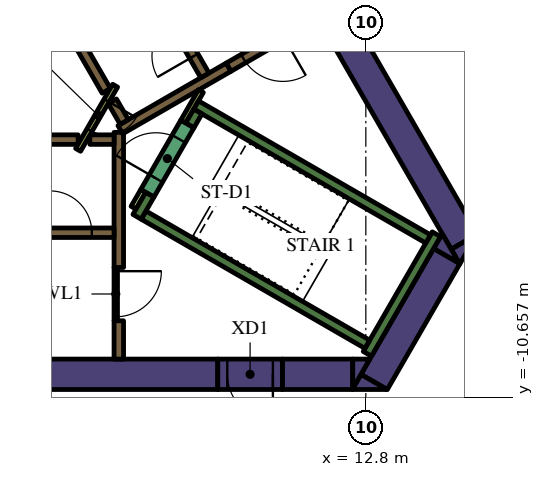
"""IFC4 building model, lengths in metres.
Left out: names, types, materials, properties, quantities, classifications, styles, units other than length and angle.
Written with IfcOpenShell. Run it as: python <this file> out.ifc"""

import sys

from ifc_helpers import new_model, si_unit, direction, frame, frame_2d, origin, place, context, subcontext, project, spatial, polyline, rectangle, outline, extrude, element, fill, save


model = new_model("IFC4")
c1 = context("Model", 3, precision=1e-05, world=origin(), true_north=direction((0.0, 1.0)))
c2 = subcontext(c1, "Body", "Model", "MODEL_VIEW")
j1 = project(units=[si_unit("LENGTHUNIT", "METRE"), si_unit("PLANEANGLEUNIT", "RADIAN")], contexts=[c1])
p1 = place(None, origin())
s1 = spatial("IfcSite", under=j1, at=p1, CompositionType="ELEMENT")
p2 = place(p1, origin())
s2 = spatial("IfcBuilding", under=s1, at=p2, CompositionType="ELEMENT")
p3 = place(p2, frame((0.0, 0.0, 150.0)))
s3 = spatial("IfcBuildingStorey", under=s2, at=p3, CompositionType="ELEMENT", Elevation=150.0)
p4 = place(p3, frame((9.129, 4.289, 0.0), z_axis=(0.0, 0.0, 1.0), x_axis=(0.499995742806, -0.866027861663, 0.0)))
e1 = element("IfcWall", 1, at=p4, inside=s3, PredefinedType="SOLIDWALL", context=c2, shape_type="SweptSolid", body=[
    extrude(rectangle(XDim=12.527, YDim=0.8, at=frame_2d((6.264, 0.0))), origin(), (0.0, 0.0, 1.0), 4.2),
])
p5 = place(p3, origin())
e2 = element("IfcWall", 2, at=p5, inside=s3, PredefinedType="SOLIDWALL", context=c2, shape_type="SweptSolid", body=[
    extrude(outline(polyline([(15.271, -7.15), (15.047, -6.762), (15.719, -6.374), (15.271, -7.15)])), origin(), (0.0, 0.0, 1.0), 4.2),
])
p6 = place(p3, frame((13.018, -10.252, 0.0), z_axis=(0.0, 0.0, 1.0), x_axis=(0.499984020225, 0.866034629516, 0.0)))
e3 = element("IfcWall", 3, at=p6, inside=s3, PredefinedType="SOLIDWALL", context=c2, shape_type="SweptSolid", body=[
    extrude(rectangle(XDim=3.824, YDim=0.8, at=frame_2d((1.912, 0.0))), origin(), (0.0, 0.0, 1.0), 4.2),
])
e4 = element("IfcWall", 4, at=p5, inside=s3, PredefinedType="SOLIDWALL", context=c2, shape_type="SweptSolid", body=[
    extrude(outline(polyline([(12.671, -10.053), (13.358, -10.45), (12.442, -10.45), (12.671, -10.053)])), origin(), (0.0, 0.0, 1.0), 4.2),
])
e5 = element("IfcWall", 5, at=p5, inside=s3, PredefinedType="SOLIDWALL", context=c2, shape_type="SweptSolid", body=[
    extrude(outline(polyline([(14.809, -6.35), (15.257, -7.126), (14.585, -6.738), (14.809, -6.35)])), origin(), (0.0, 0.0, 1.0), 4.2),
])
p7 = place(p3, frame((10.604, -10.05, 0.0), z_axis=(0.0, 0.0, 1.0), x_axis=(1.0, 0.0, 0.0)))
e6 = element("IfcWall", 6, at=p7, inside=s3, PredefinedType="SOLIDWALL", context=c2, shape_type="SweptSolid", body=[
    extrude(rectangle(XDim=1.849, YDim=0.8, at=frame_2d((0.925, 0.0))), origin(), (0.0, 0.0, 1.0), 4.2),
])
e7 = element("IfcWall", 7, at=p5, inside=s3, PredefinedType="SOLIDWALL", context=c2, shape_type="SweptSolid", body=[
    extrude(outline(polyline([(12.904, -9.65), (12.456, -10.426), (12.456, -9.65), (12.904, -9.65)])), origin(), (0.0, 0.0, 1.0), 4.2),
])
p8 = place(p3, frame((-13.378, -10.05, 0.0), z_axis=(0.0, 0.0, 1.0), x_axis=(1.0, 0.0, 0.0)))
e8 = element("IfcWall", 8, at=p8, inside=s3, PredefinedType="SOLIDWALL", context=c2, shape_type="SweptSolid", body=[
    extrude(rectangle(XDim=22.282, YDim=0.8, at=frame_2d((11.141, 0.0))), origin(), (0.0, 0.0, 1.0), 4.2),
])
p9 = place(p3, frame((12.84, -9.511, 0.0), z_axis=(0.0, 0.0, 1.0), x_axis=(0.499997733992, 0.866026712061, 0.0)))
e9 = element("IfcWall", 9, at=p9, inside=s3, PredefinedType="SOLIDWALL", context=c2, shape_type="SweptSolid", body=[
    extrude(rectangle(XDim=3.634, YDim=0.25, at=frame_2d((1.817, 0.0))), origin(), (0.0, 0.0, 1.0), 4.2),
])
p10 = place(p3, frame((12.84, -9.261, 0.0), z_axis=(0.0, 0.0, 1.0), x_axis=(-0.866013990052, 0.500019768644, 0.0)))
e10 = element("IfcWall", 10, at=p10, inside=s3, PredefinedType="SOLIDWALL", context=c2, shape_type="SweptSolid", body=[
    extrude(rectangle(XDim=6.8, YDim=0.25, at=frame_2d((3.4, 0.0))), origin(), (0.0, 0.0, 1.0), 4.2),
])
p11 = place(p3, frame((6.78, -5.906, 0.0), z_axis=(0.0, 0.0, 1.0), x_axis=(0.500223362819, 0.865896406789, 0.0)))
e11 = element("IfcWall", 11, at=p11, inside=s3, PredefinedType="SOLIDWALL", context=c2, shape_type="SweptSolid", body=[
    extrude(rectangle(XDim=0.675, YDim=0.25, at=frame_2d((0.337, 0.0))), origin(), (0.0, 0.0, 1.0), 4.2),
])
p12 = place(p3, frame((8.334, -2.964, 0.0), z_axis=(0.0, 0.0, 1.0), x_axis=(0.866016039709, -0.500016218704, 0.0)))
e12 = element("IfcWall", 12, at=p12, inside=s3, PredefinedType="SOLIDWALL", context=c2, shape_type="SweptSolid", body=[
    extrude(rectangle(XDim=7.05, YDim=0.25, at=frame_2d((3.525, 0.0))), origin(), (0.0, 0.0, 1.0), 4.2),
])
p13 = place(p3, frame((8.168, -3.503, 0.0), z_axis=(0.0, 0.0, 1.0), x_axis=(0.49972245349, 0.866185586049, 0.0)))
e13 = element("IfcWall", 13, at=p13, inside=s3, PredefinedType="SOLIDWALL", context=c2, shape_type="SweptSolid", body=[
    extrude(rectangle(XDim=0.425, YDim=0.25, at=frame_2d((0.212, 0.0))), origin(), (0.0, 0.0, 1.0), 4.2),
])
p14 = place(p3, frame((-5.259, -3.875, 0.0), z_axis=(0.0, 0.0, 1.0), x_axis=(1.0, 0.0, 0.0)))
e14 = element("IfcWall", 14, at=p14, inside=s3, PredefinedType="SOLIDWALL", context=c2, shape_type="SweptSolid", body=[
    extrude(rectangle(XDim=10.489, YDim=0.25, at=frame_2d((5.244, 0.0))), origin(), (0.0, 0.0, 1.0), 4.2),
])
p15 = place(p3, frame((6.3, -7.24, 0.0), z_axis=(0.0, 0.0, 1.0), x_axis=(0.0, 1.0, 0.0)))
e15 = element("IfcWall", 15, at=p15, inside=s3, PredefinedType="SOLIDWALL", context=c2, shape_type="SweptSolid", body=[
    extrude(rectangle(XDim=3.556, YDim=0.25, at=frame_2d((1.778, 0.0))), origin(), (0.0, 0.0, 1.0), 4.2),
])
p16 = place(p3, frame((6.3, -9.65, 0.0), z_axis=(0.0, 0.0, 1.0), x_axis=(0.0, 1.0, 0.0)))
e16 = element("IfcWall", 16, at=p16, inside=s3, PredefinedType="SOLIDWALL", context=c2, shape_type="SweptSolid", body=[
    extrude(rectangle(XDim=1.008, YDim=0.25, at=frame_2d((0.504, 0.0))), origin(), (0.0, 0.0, 1.0), 4.2),
])
p17 = place(p3, frame((5.538, -3.875, 0.0), z_axis=(0.0, 0.0, 1.0), x_axis=(1.0, 0.0, 0.0)))
e17 = element("IfcWall", 17, at=p17, inside=s3, PredefinedType="SOLIDWALL", context=c2, shape_type="SweptSolid", body=[
    extrude(rectangle(XDim=0.637, YDim=0.25, at=frame_2d((0.318, 0.0))), origin(), (0.0, 0.0, 1.0), 4.2),
])
p18 = place(p3, frame((9.19, -1.969, 0.0), z_axis=(0.0, 0.0, 1.0), x_axis=(-0.866057109641, -0.499945079824, 0.0)))
e18 = element("IfcWall", 18, at=p18, inside=s3, PredefinedType="SOLIDWALL", context=c2, shape_type="SweptSolid", body=[
    extrude(rectangle(XDim=3.291, YDim=0.25, at=frame_2d((1.646, 0.0))), origin(), (0.0, 0.0, 1.0), 4.2),
])
p19 = place(p3, frame((6.13, -2.867, 0.0), z_axis=(0.0, 0.0, 1.0), x_axis=(0.500160776593, -0.865932559475, 0.0)))
e19 = element("IfcWall", 19, at=p19, inside=s3, PredefinedType="SOLIDWALL", context=c2, shape_type="SweptSolid", body=[
    extrude(rectangle(XDim=0.627, YDim=0.25, at=frame_2d((0.313, 0.0))), origin(), (0.0, 0.0, 1.0), 4.2),
])
p20 = place(p3, frame((5.97, -2.591, 0.0), z_axis=(0.0, 0.0, 1.0), x_axis=(-0.499994469932, 0.866028596547, 0.0)))
e20 = element("IfcWall", 20, at=p20, inside=s3, PredefinedType="SOLIDWALL", context=c2, shape_type="SweptSolid", body=[
    extrude(rectangle(XDim=10.488, YDim=0.25, at=frame_2d((5.244, 0.0))), origin(), (0.0, 0.0, 1.0), 4.2),
])
p21 = place(p3, frame((6.945, -5.222, 0.0), z_axis=(0.0, 0.0, 1.0), x_axis=(-0.499818422106, -0.866130212453, 0.0)))
e21 = element("IfcWall", 21, at=p21, inside=s3, PredefinedType="PARTITIONING", context=c2, shape_type="SweptSolid", body=[
    extrude(rectangle(XDim=0.514, YDim=0.15, at=frame_2d((0.257, 0.0))), origin(), (0.0, 0.0, 1.0), 3.15),
])
p22 = place(p3, frame((8.459, -2.599, 0.0), z_axis=(0.0, 0.0, 1.0), x_axis=(-0.500041054325, -0.866001699761, 0.0)))
e22 = element("IfcWall", 22, at=p22, inside=s3, PredefinedType="PARTITIONING", context=c2, shape_type="SweptSolid", body=[
    extrude(rectangle(XDim=0.929, YDim=0.15, at=frame_2d((0.464, 0.0))), origin(), (0.0, 0.0, 1.0), 4.2),
])
p23 = place(p3, frame((-6.175, -6.325, 0.0), z_axis=(0.0, 0.0, 1.0), x_axis=(1.0, 0.0, 0.0)))
e23 = element("IfcWall", 23, at=p23, inside=s3, PredefinedType="SOLIDWALL", context=c2, shape_type="SweptSolid", body=[
    extrude(rectangle(XDim=12.35, YDim=0.25, at=frame_2d((6.175, 0.0))), origin(), (0.0, 0.0, 1.0), 4.2),
])
p24 = place(p23, frame((0.585, 0.0, 0.0)))
e24 = element("IfcOpeningElement", 24, at=p24, cuts=e23, PredefinedType="OPENING", context=c2, shape_type="SweptSolid", body=[
    extrude(rectangle(XDim=1.1, YDim=2.1, at=frame_2d((0.55, 1.05))), frame((0.0, 0.135, 0.0), z_axis=(0.0, -1.0, 0.0), x_axis=(1.0, 0.0, 0.0)), (0.0, 0.0, 1.0), 0.27),
])
p25 = place(p23, frame((3.105, 0.0, 0.0)))
e25 = element("IfcOpeningElement", 25, at=p25, cuts=e23, PredefinedType="OPENING", context=c2, shape_type="SweptSolid", body=[
    extrude(rectangle(XDim=1.1, YDim=2.1, at=frame_2d((0.55, 1.05))), frame((0.0, 0.135, 0.0), z_axis=(0.0, -1.0, 0.0), x_axis=(1.0, 0.0, 0.0)), (0.0, 0.0, 1.0), 0.27),
])
p26 = place(p23, frame((5.625, 0.0, 0.0)))
e26 = element("IfcOpeningElement", 26, at=p26, cuts=e23, PredefinedType="OPENING", context=c2, shape_type="SweptSolid", body=[
    extrude(rectangle(XDim=1.1, YDim=2.1, at=frame_2d((0.55, 1.05))), frame((0.0, 0.135, 0.0), z_axis=(0.0, -1.0, 0.0), x_axis=(1.0, 0.0, 0.0)), (0.0, 0.0, 1.0), 0.27),
])
p27 = place(p23, frame((8.145, 0.0, 0.0)))
e27 = element("IfcOpeningElement", 27, at=p27, cuts=e23, PredefinedType="OPENING", context=c2, shape_type="SweptSolid", body=[
    extrude(rectangle(XDim=1.1, YDim=2.1, at=frame_2d((0.55, 1.05))), frame((0.0, 0.135, 0.0), z_axis=(0.0, -1.0, 0.0), x_axis=(1.0, 0.0, 0.0)), (0.0, 0.0, 1.0), 0.27),
])
p28 = place(p23, frame((10.665, 0.0, 0.0)))
e28 = element("IfcOpeningElement", 28, at=p28, cuts=e23, PredefinedType="OPENING", context=c2, shape_type="SweptSolid", body=[
    extrude(rectangle(XDim=1.1, YDim=2.1, at=frame_2d((0.55, 1.05))), frame((0.0, 0.135, 0.0), z_axis=(0.0, -1.0, 0.0), x_axis=(1.0, 0.0, 0.0)), (0.0, 0.0, 1.0), 0.27),
])
p29 = place(p3, frame((8.565, -2.185, 0.0), z_axis=(0.0, 0.0, 1.0), x_axis=(-0.499997954832, 0.866026584559, 0.0)))
e29 = element("IfcWall", 29, at=p29, inside=s3, PredefinedType="SOLIDWALL", context=c2, shape_type="SweptSolid", body=[
    extrude(rectangle(XDim=12.35, YDim=0.25, at=frame_2d((6.175, 0.0))), origin(), (0.0, 0.0, 1.0), 4.2),
])
p30 = place(p29, frame((0.585, 0.0, 0.0)))
e30 = element("IfcOpeningElement", 30, at=p30, cuts=e29, PredefinedType="OPENING", context=c2, shape_type="SweptSolid", body=[
    extrude(rectangle(XDim=1.1, YDim=2.1, at=frame_2d((0.55, 1.05))), frame((0.0, 0.135, 0.0), z_axis=(0.0, -1.0, 0.0), x_axis=(1.0, 0.0, 0.0)), (0.0, 0.0, 1.0), 0.27),
])
p31 = place(p3, frame((7.053, -5.284, 0.0), z_axis=(0.0, 0.0, 1.0), x_axis=(0.500078061341, 0.865980330357, 0.0)))
e31 = element("IfcWall", 31, at=p31, inside=s3, PredefinedType="SOLIDWALL", context=c2, shape_type="SweptSolid", body=[
    extrude(rectangle(XDim=2.1, YDim=0.4, at=frame_2d((1.05, 0.0))), origin(), (0.0, 0.0, 1.0), 4.2),
])
p32 = place(p31, frame((0.45, 0.0, 0.0)))
e32 = element("IfcOpeningElement", 32, at=p32, cuts=e31, PredefinedType="OPENING", context=c2, shape_type="SweptSolid", body=[
    extrude(rectangle(XDim=1.2, YDim=2.1, at=frame_2d((0.6, 1.05))), frame((0.0, 0.21, 0.0), z_axis=(0.0, -1.0, 0.0), x_axis=(1.0, 0.0, 0.0)), (0.0, 0.0, 1.0), 0.42),
])
p33 = place(p3, frame((6.203, -2.456, 0.0), z_axis=(0.0, 0.0, 1.0), x_axis=(-0.500043961785, -0.866000020948, 0.0)))
e33 = element("IfcWall", 33, at=p33, inside=s3, PredefinedType="PARTITIONING", context=c2, shape_type="SweptSolid", body=[
    extrude(rectangle(XDim=1.95, YDim=0.15, at=frame_2d((0.975, 0.0))), origin(), (0.0, 0.0, 1.0), 4.2),
])
p34 = place(p33, frame((0.45, 0.0, 0.0)))
e34 = element("IfcOpeningElement", 34, at=p34, cuts=e33, PredefinedType="OPENING", context=c2, shape_type="SweptSolid", body=[
    extrude(rectangle(XDim=0.9, YDim=2.1, at=frame_2d((0.45, 1.05))), frame((0.0, 0.085, 0.0), z_axis=(0.0, -1.0, 0.0), x_axis=(1.0, 0.0, 0.0)), (0.0, 0.0, 1.0), 0.17),
])
p35 = place(p3, frame((6.22, -7.237, 0.0), z_axis=(0.0, 0.0, 1.0), x_axis=(0.0, -1.0, 0.0)))
e35 = element("IfcWall", 35, at=p35, inside=s3, PredefinedType="PARTITIONING", context=c2, shape_type="SweptSolid", body=[
    extrude(rectangle(XDim=1.4, YDim=0.09, at=frame_2d((0.7, 0.0))), origin(), (0.0, 0.0, 1.0), 3.15),
])
p36 = place(p35, frame((0.1, 0.0, 0.0)))
e36 = element("IfcOpeningElement", 36, at=p36, cuts=e35, PredefinedType="OPENING", context=c2, shape_type="SweptSolid", body=[
    extrude(rectangle(XDim=1.2, YDim=2.1, at=frame_2d((0.6, 1.05))), frame((0.0, 0.055, 0.0), z_axis=(0.0, -1.0, 0.0), x_axis=(1.0, 0.0, 0.0)), (0.0, 0.0, 1.0), 0.11),
])
p37 = place(p3, frame((11.009, -0.919, 0.0), z_axis=(0.0, 0.0, 1.0), x_axis=(-0.866059744384, -0.49994051562, 0.0)))
e37 = element("IfcWall", 37, at=p37, inside=s3, PredefinedType="SOLIDWALL", context=c2, shape_type="SweptSolid", body=[
    extrude(rectangle(XDim=2.1, YDim=0.25, at=frame_2d((1.05, 0.0))), origin(), (0.0, 0.0, 1.0), 4.2),
])
p38 = place(p37, frame((0.45, 0.0, 0.0)))
e38 = element("IfcOpeningElement", 38, at=p38, cuts=e37, PredefinedType="OPENING", context=c2, shape_type="SweptSolid", body=[
    extrude(rectangle(XDim=1.2, YDim=2.1, at=frame_2d((0.6, 1.05))), frame((0.0, 0.135, 0.0), z_axis=(0.0, -1.0, 0.0), x_axis=(1.0, 0.0, 0.0)), (0.0, 0.0, 1.0), 0.27),
])
p39 = place(p3, frame((10.604, -10.05, 0.0), z_axis=(0.0, 0.0, 1.0), x_axis=(-1.0, 0.0, 0.0)))
e39 = element("IfcWall", 39, at=p39, inside=s3, PredefinedType="SOLIDWALL", context=c2, shape_type="SweptSolid", body=[
    extrude(rectangle(XDim=1.7, YDim=0.8, at=frame_2d((0.85, 0.0))), origin(), (0.0, 0.0, 1.0), 4.2),
])
p40 = place(p39, frame((0.25, 0.0, 0.0)))
e40 = element("IfcOpeningElement", 40, at=p40, cuts=e39, PredefinedType="OPENING", context=c2, shape_type="SweptSolid", body=[
    extrude(rectangle(XDim=1.2, YDim=2.1, at=frame_2d((0.6, 1.05))), frame((0.0, 0.41, 0.0), z_axis=(0.0, -1.0, 0.0), x_axis=(1.0, 0.0, 0.0)), (0.0, 0.0, 1.0), 0.82),
])
p41 = place(p3, frame((14.825, -12.722, 0.0), z_axis=(0.0, 0.0, 1.0), x_axis=(0.499981686864, 0.86603597662, 0.0)))
e41 = element("IfcWall", 41, at=p41, inside=s3, PredefinedType="PARTITIONING", context=c2, shape_type="SweptSolid", body=[
    extrude(rectangle(XDim=3.506, YDim=0.2, at=frame_2d((1.753, 0.0))), origin(), (0.0, 0.0, 1.0), 3.15),
])
p42 = place(p3, frame((18.504, -6.35, 0.0), z_axis=(0.0, 0.0, 1.0), x_axis=(-0.499995029582, 0.866028273438, 0.0)))
e42 = element("IfcWall", 42, at=p42, inside=s3, PredefinedType="PARTITIONING", context=c2, shape_type="SweptSolid", body=[
    extrude(rectangle(XDim=9.717, YDim=0.2, at=frame_2d((4.859, 0.0))), origin(), (0.0, 0.0, 1.0), 3.15),
])
p43 = place(p28, origin())
e43 = element("IfcDoor", 43, at=p43, inside=s3, OperationType="DOUBLE_DOOR_SLIDING", PredefinedType="DOOR", context=c2, shape_type="SweptSolid", body=[
    extrude(rectangle(XDim=1.1, YDim=2.1, at=frame_2d((0.55, 1.05))), frame((0.0, 0.025, 0.0), z_axis=(0.0, -1.0, 0.0), x_axis=(1.0, 0.0, 0.0)), (0.0, 0.0, 1.0), 0.05),
])
fill(e28, e43)
p44 = place(p30, origin())
e44 = element("IfcDoor", 44, at=p44, inside=s3, OperationType="DOUBLE_DOOR_SLIDING", PredefinedType="DOOR", context=c2, shape_type="SweptSolid", body=[
    extrude(rectangle(XDim=1.1, YDim=2.1, at=frame_2d((0.55, 1.05))), frame((0.0, 0.025, 0.0), z_axis=(0.0, -1.0, 0.0), x_axis=(1.0, 0.0, 0.0)), (0.0, 0.0, 1.0), 0.05),
])
fill(e30, e44)
p45 = place(p32, origin())
e45 = element("IfcDoor", 45, at=p45, inside=s3, OperationType="SINGLE_SWING_LEFT", PredefinedType="DOOR", context=c2, shape_type="SweptSolid", body=[
    extrude(rectangle(XDim=1.2, YDim=2.1, at=frame_2d((0.6, 1.05))), frame((0.0, 0.025, 0.0), z_axis=(0.0, -1.0, 0.0), x_axis=(1.0, 0.0, 0.0)), (0.0, 0.0, 1.0), 0.05),
])
fill(e32, e45)
p46 = place(p34, origin())
e46 = element("IfcDoor", 46, at=p46, inside=s3, OperationType="SINGLE_SWING_LEFT", PredefinedType="DOOR", context=c2, shape_type="SweptSolid", body=[
    extrude(rectangle(XDim=0.9, YDim=2.1, at=frame_2d((0.45, 1.05))), frame((0.0, 0.025, 0.0), z_axis=(0.0, -1.0, 0.0), x_axis=(1.0, 0.0, 0.0)), (0.0, 0.0, 1.0), 0.05),
])
fill(e34, e46)
p47 = place(p36, origin())
e47 = element("IfcDoor", 47, at=p47, inside=s3, OperationType="SINGLE_SWING_LEFT", PredefinedType="DOOR", context=c2, shape_type="SweptSolid", body=[
    extrude(rectangle(XDim=1.2, YDim=2.1, at=frame_2d((0.6, 1.05))), frame((0.0, 0.025, 0.0), z_axis=(0.0, -1.0, 0.0), x_axis=(1.0, 0.0, 0.0)), (0.0, 0.0, 1.0), 0.05),
])
fill(e36, e47)
p48 = place(p38, origin())
e48 = element("IfcDoor", 48, at=p48, inside=s3, OperationType="SINGLE_SWING_LEFT", PredefinedType="DOOR", context=c2, shape_type="SweptSolid", body=[
    extrude(rectangle(XDim=1.2, YDim=2.1, at=frame_2d((0.6, 1.05))), frame((0.0, 0.025, 0.0), z_axis=(0.0, -1.0, 0.0), x_axis=(1.0, 0.0, 0.0)), (0.0, 0.0, 1.0), 0.05),
])
fill(e38, e48)
p49 = place(p40, origin())
e49 = element("IfcDoor", 49, at=p49, inside=s3, OperationType="SINGLE_SWING_LEFT", PredefinedType="DOOR", context=c2, shape_type="SweptSolid", body=[
    extrude(rectangle(XDim=1.2, YDim=2.1, at=frame_2d((0.6, 1.05))), frame((0.0, 0.025, 0.0), z_axis=(0.0, -1.0, 0.0), x_axis=(1.0, 0.0, 0.0)), (0.0, 0.0, 1.0), 0.05),
])
fill(e40, e49)
save(model, sys.argv[1])
